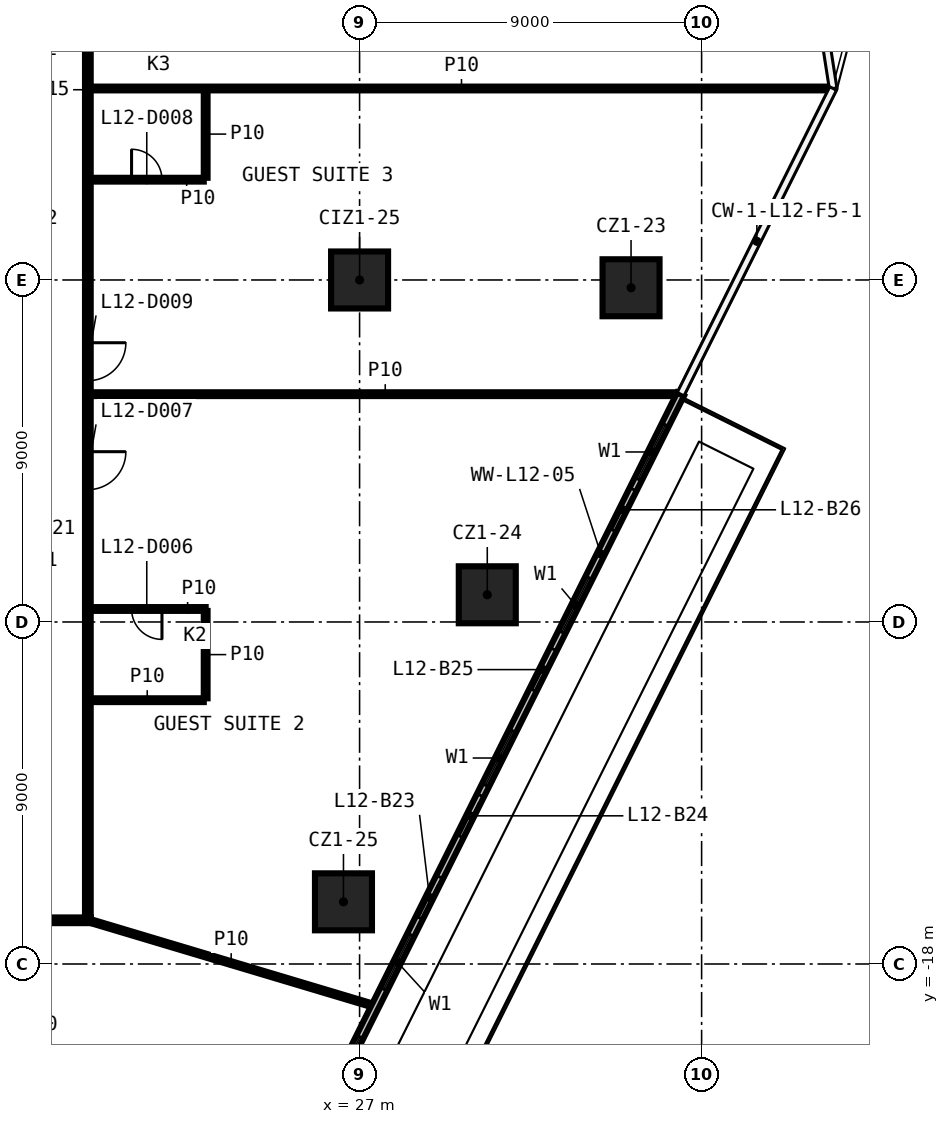
"""IFC4 building model, lengths in metres.
Left out: names, types, materials, properties, quantities, classifications, styles, units other than length and angle.
Written with IfcOpenShell. Run it as: python <this file> out.ifc"""

import sys

from ifc_helpers import new_model, si_unit, direction, frame, frame_2d, origin, origin_2d, place, context, subcontext, project, spatial, rectangle, extrude, element, fill, save


model = new_model("IFC4")
c1 = context("Model", 3, precision=1e-05, world=origin(), true_north=direction((0.0, 1.0)))
c2 = subcontext(c1, "Body", "Model", "MODEL_VIEW")
j1 = project(units=[si_unit("LENGTHUNIT", "METRE"), si_unit("PLANEANGLEUNIT", "RADIAN")], contexts=[c1])
p1 = place(None, origin())
s1 = spatial("IfcSite", under=j1, at=p1, CompositionType="ELEMENT")
p2 = place(p1, origin())
s2 = spatial("IfcBuilding", under=s1, at=p2, CompositionType="ELEMENT")
p3 = place(p2, frame((0.0, 0.0, 66.2)))
s3 = spatial("IfcBuildingStorey", under=s2, at=p3, CompositionType="ELEMENT", Elevation=66.2)
for number, where, z_axis, x_axis in (
    (1, (34.143, -0.205, 0.0), (0.0, 0.0, 1.0), (1.0, 0.0, 0.0)),
    (2, (30.36, -8.284, 0.0), (0.0, 0.0, 1.0), (1.0, 0.0, 0.0)),
    (3, (26.576, -16.364, 0.0), (0.0, 0.0, 1.0), (1.0, 0.0, 0.0)),
    (4, (27.0, 0.0, 0.0), (0.0, 0.0, 1.0), (1.0, 0.0, 0.0)),
):
    element("IfcColumn", number, at=place(p3, frame(where, z_axis=z_axis, x_axis=x_axis)), inside=s3, PredefinedType="COLUMN", context=c2, shape_type="SweptSolid", body=[
        extrude(rectangle(XDim=1.5, YDim=1.5, at=origin_2d()), origin(), (0.0, 0.0, 1.0), 3.3),
    ])
p4 = place(p3, frame((19.925, -16.85, 0.0), z_axis=(0.0, 0.0, 1.0), x_axis=(-1.0, 0.0, 0.0)))
e5 = element("IfcWall", 5, at=p4, inside=s3, PredefinedType="PARTITIONING", context=c2, shape_type="SweptSolid", body=[
    extrude(rectangle(XDim=39.85, YDim=0.15, at=frame_2d((19.925, 0.0))), origin(), (0.0, 0.0, 1.0), 3.3),
])
p5 = place(p4, frame((30.959, 0.0, 0.0)))
e6 = element("IfcOpeningElement", 6, at=p5, cuts=e5, PredefinedType="OPENING", context=c2, shape_type="SweptSolid", body=[
    extrude(rectangle(XDim=0.9, YDim=2.1, at=frame_2d((0.45, 1.05))), frame((0.0, 0.085, 0.0), z_axis=(0.0, -1.0, 0.0), x_axis=(1.0, 0.0, 0.0)), (0.0, 0.0, 1.0), 0.17),
])
p6 = place(p4, frame((22.077, 0.0, 0.0)))
e7 = element("IfcOpeningElement", 7, at=p6, cuts=e5, PredefinedType="OPENING", context=c2, shape_type="SweptSolid", body=[
    extrude(rectangle(XDim=0.9, YDim=2.1, at=frame_2d((0.45, 1.05))), frame((0.0, 0.085, 0.0), z_axis=(0.0, -1.0, 0.0), x_axis=(1.0, 0.0, 0.0)), (0.0, 0.0, 1.0), 0.17),
])
p7 = place(p3, frame((19.925, -11.058, 0.0), z_axis=(0.0, 0.0, 1.0), x_axis=(1.0, 0.0, 0.0)))
e8 = element("IfcWall", 8, at=p7, inside=s3, PredefinedType="PARTITIONING", context=c2, shape_type="SweptSolid", body=[
    extrude(rectangle(XDim=2.975, YDim=0.1, at=frame_2d((1.487, 0.0))), origin(), (0.0, 0.0, 1.0), 3.3),
])
p8 = place(p3, frame((22.95, -8.658, 0.0), z_axis=(0.0, 0.0, 1.0), x_axis=(-1.0, 0.0, 0.0)))
e9 = element("IfcWall", 9, at=p8, inside=s3, PredefinedType="PARTITIONING", context=c2, shape_type="SweptSolid", body=[
    extrude(rectangle(XDim=3.025, YDim=0.1, at=frame_2d((1.512, 0.0))), origin(), (0.0, 0.0, 1.0), 3.3),
])
p9 = place(p8, frame((1.15, 0.0, 0.0)))
e10 = element("IfcOpeningElement", 10, at=p9, cuts=e9, PredefinedType="OPENING", context=c2, shape_type="SweptSolid", body=[
    extrude(rectangle(XDim=0.8, YDim=2.1, at=frame_2d((0.4, 1.05))), frame((0.0, 0.06, 0.0), z_axis=(0.0, -1.0, 0.0), x_axis=(1.0, 0.0, 0.0)), (0.0, 0.0, 1.0), 0.12),
])
p10 = place(p3, frame((19.925, -3.005, 0.0), z_axis=(0.0, 0.0, 1.0), x_axis=(1.0, 0.0, 0.0)))
e11 = element("IfcWall", 11, at=p10, inside=s3, PredefinedType="PARTITIONING", context=c2, shape_type="SweptSolid", body=[
    extrude(rectangle(XDim=15.5, YDim=0.1, at=frame_2d((7.75, 0.0))), origin(), (0.0, 0.0, 1.0), 3.3),
])
p11 = place(p3, frame((19.925, 2.639, 0.0), z_axis=(0.0, 0.0, 1.0), x_axis=(1.0, 0.0, 0.0)))
e12 = element("IfcWall", 12, at=p11, inside=s3, PredefinedType="PARTITIONING", context=c2, shape_type="SweptSolid", body=[
    extrude(rectangle(XDim=2.975, YDim=0.1, at=frame_2d((1.487, 0.0))), origin(), (0.0, 0.0, 1.0), 3.3),
])
p12 = place(p11, frame((1.075, 0.0, 0.0)))
e13 = element("IfcOpeningElement", 13, at=p12, cuts=e12, PredefinedType="OPENING", context=c2, shape_type="SweptSolid", body=[
    extrude(rectangle(XDim=0.8, YDim=2.1, at=frame_2d((0.4, 1.05))), frame((0.0, 0.06, 0.0), z_axis=(0.0, -1.0, 0.0), x_axis=(1.0, 0.0, 0.0)), (0.0, 0.0, 1.0), 0.12),
])
p13 = place(p3, frame((19.925, 5.039, 0.0), z_axis=(0.0, 0.0, 1.0), x_axis=(1.0, 0.0, 0.0)))
e14 = element("IfcWall", 14, at=p13, inside=s3, PredefinedType="PARTITIONING", context=c2, shape_type="SweptSolid", body=[
    extrude(rectangle(XDim=19.513, YDim=0.1, at=frame_2d((9.757, 0.0))), origin(), (0.0, 0.0, 1.0), 3.3),
])
for number, where, z_axis, x_axis in (
    (15, (22.95, -11.009, 0.0), (0.0, 0.0, 1.0), (0.0, 1.0, 0.0)),
    (16, (22.95, 2.689, 0.0), (0.0, 0.0, 1.0), (0.0, 1.0, 0.0)),
):
    element("IfcWall", number, at=place(p3, frame(where, z_axis=z_axis, x_axis=x_axis)), inside=s3, PredefinedType="PARTITIONING", context=c2, shape_type="SweptSolid", body=[
        extrude(rectangle(XDim=2.3, YDim=0.1, at=frame_2d((1.15, 0.0))), origin(), (0.0, 0.0, 1.0), 3.3),
    ])
p14 = place(p3, frame((19.85, 16.775, 0.0), z_axis=(0.0, 0.0, 1.0), x_axis=(0.0, -1.0, 0.0)))
e17 = element("IfcWall", 17, at=p14, inside=s3, PredefinedType="PARTITIONING", context=c2, shape_type="SweptSolid", body=[
    extrude(rectangle(XDim=33.55, YDim=0.15, at=frame_2d((16.775, 0.0))), origin(), (0.0, 0.0, 1.0), 3.3),
])
p15 = place(p14, frame((21.293, 0.0, 0.0)))
e18 = element("IfcOpeningElement", 18, at=p15, cuts=e17, PredefinedType="OPENING", context=c2, shape_type="SweptSolid", body=[
    extrude(rectangle(XDim=1.0, YDim=2.1, at=frame_2d((0.5, 1.05))), frame((0.0, 0.085, 0.0), z_axis=(0.0, -1.0, 0.0), x_axis=(1.0, 0.0, 0.0)), (0.0, 0.0, 1.0), 0.17),
])
p16 = place(p14, frame((18.427, 0.0, 0.0)))
e19 = element("IfcOpeningElement", 19, at=p16, cuts=e17, PredefinedType="OPENING", context=c2, shape_type="SweptSolid", body=[
    extrude(rectangle(XDim=1.0, YDim=2.1, at=frame_2d((0.5, 1.05))), frame((0.0, 0.085, 0.0), z_axis=(0.0, -1.0, 0.0), x_axis=(1.0, 0.0, 0.0)), (0.0, 0.0, 1.0), 0.17),
])
p17 = place(p14, frame((4.211, 0.0, 0.0)))
e20 = element("IfcOpeningElement", 20, at=p17, cuts=e17, PredefinedType="OPENING", context=c2, shape_type="SweptSolid", body=[
    extrude(rectangle(XDim=0.9, YDim=2.1, at=frame_2d((0.45, 1.05))), frame((0.0, 0.085, 0.0), z_axis=(0.0, -1.0, 0.0), x_axis=(1.0, 0.0, 0.0)), (0.0, 0.0, 1.0), 0.17),
])
p18 = place(p3, frame((19.85, -16.85, 0.0), z_axis=(0.0, 0.0, 1.0), x_axis=(0.958075156501, -0.286517005597, 0.0)))
e21 = element("IfcWall", 21, at=p18, inside=s3, PredefinedType="PARTITIONING", context=c2, shape_type="SweptSolid", body=[
    extrude(rectangle(XDim=7.873, YDim=0.1, at=frame_2d((3.936, 0.0))), origin(), (0.0, 0.0, 1.0), 3.3),
])
p19 = place(p3, frame((23.394, -27.165, 0.0), z_axis=(0.0, 0.0, 1.0), x_axis=(0.446421309396, 0.894822895615, 0.0)))
e22 = element("IfcWall", 22, at=p19, inside=s3, PredefinedType="SOLIDWALL", context=c2, shape_type="SweptSolid", body=[
    extrude(rectangle(XDim=27.0, YDim=0.2, at=frame_2d((13.5, 0.0))), origin(), (0.0, 0.0, 1.0), 3.3),
])
p20 = place(p19, frame((0.5, 0.0, 0.6)))
e23 = element("IfcOpeningElement", 23, at=p20, cuts=e22, PredefinedType="OPENING", context=c2, shape_type="SweptSolid", body=[
    extrude(rectangle(XDim=1.6, YDim=2.4, at=frame_2d((0.8, 1.2))), frame((0.0, 0.11, 0.0), z_axis=(0.0, -1.0, 0.0), x_axis=(1.0, 0.0, 0.0)), (0.0, 0.0, 1.0), 0.22),
])
p21 = place(p19, frame((3.0, 0.0, 0.0)))
e24 = element("IfcOpeningElement", 24, at=p21, cuts=e22, PredefinedType="OPENING", context=c2, shape_type="SweptSolid", body=[
    extrude(rectangle(XDim=1.2, YDim=2.4, at=frame_2d((0.6, 1.2))), frame((0.0, 0.11, 0.0), z_axis=(0.0, -1.0, 0.0), x_axis=(1.0, 0.0, 0.0)), (0.0, 0.0, 1.0), 0.22),
])
p22 = place(p19, frame((6.5, 0.0, 0.6)))
e25 = element("IfcOpeningElement", 25, at=p22, cuts=e22, PredefinedType="OPENING", context=c2, shape_type="SweptSolid", body=[
    extrude(rectangle(XDim=1.6, YDim=2.4, at=frame_2d((0.8, 1.2))), frame((0.0, 0.11, 0.0), z_axis=(0.0, -1.0, 0.0), x_axis=(1.0, 0.0, 0.0)), (0.0, 0.0, 1.0), 0.22),
])
p23 = place(p19, frame((5.0, 0.0, 0.0)))
e26 = element("IfcOpeningElement", 26, at=p23, cuts=e22, PredefinedType="OPENING", context=c2, shape_type="SweptSolid", body=[
    extrude(rectangle(XDim=1.2, YDim=2.4, at=frame_2d((0.6, 1.2))), frame((0.0, 0.11, 0.0), z_axis=(0.0, -1.0, 0.0), x_axis=(1.0, 0.0, 0.0)), (0.0, 0.0, 1.0), 0.22),
])
p24 = place(p19, frame((9.5, 0.0, 0.6)))
e27 = element("IfcOpeningElement", 27, at=p24, cuts=e22, PredefinedType="OPENING", context=c2, shape_type="SweptSolid", body=[
    extrude(rectangle(XDim=1.6, YDim=2.4, at=frame_2d((0.8, 1.2))), frame((0.0, 0.11, 0.0), z_axis=(0.0, -1.0, 0.0), x_axis=(1.0, 0.0, 0.0)), (0.0, 0.0, 1.0), 0.22),
])
p25 = place(p19, frame((11.6, 0.0, 0.0)))
e28 = element("IfcOpeningElement", 28, at=p25, cuts=e22, PredefinedType="OPENING", context=c2, shape_type="SweptSolid", body=[
    extrude(rectangle(XDim=1.2, YDim=2.4, at=frame_2d((0.6, 1.2))), frame((0.0, 0.11, 0.0), z_axis=(0.0, -1.0, 0.0), x_axis=(1.0, 0.0, 0.0)), (0.0, 0.0, 1.0), 0.22),
])
p26 = place(p19, frame((15.5, 0.0, 0.6)))
e29 = element("IfcOpeningElement", 29, at=p26, cuts=e22, PredefinedType="OPENING", context=c2, shape_type="SweptSolid", body=[
    extrude(rectangle(XDim=1.6, YDim=2.4, at=frame_2d((0.8, 1.2))), frame((0.0, 0.11, 0.0), z_axis=(0.0, -1.0, 0.0), x_axis=(1.0, 0.0, 0.0)), (0.0, 0.0, 1.0), 0.22),
])
p27 = place(p19, frame((14.0, 0.0, 0.0)))
e30 = element("IfcOpeningElement", 30, at=p27, cuts=e22, PredefinedType="OPENING", context=c2, shape_type="SweptSolid", body=[
    extrude(rectangle(XDim=1.2, YDim=2.4, at=frame_2d((0.6, 1.2))), frame((0.0, 0.11, 0.0), z_axis=(0.0, -1.0, 0.0), x_axis=(1.0, 0.0, 0.0)), (0.0, 0.0, 1.0), 0.22),
])
p28 = place(p19, frame((20.0, 0.0, 0.6)))
e31 = element("IfcOpeningElement", 31, at=p28, cuts=e22, PredefinedType="OPENING", context=c2, shape_type="SweptSolid", body=[
    extrude(rectangle(XDim=1.6, YDim=2.4, at=frame_2d((0.8, 1.2))), frame((0.0, 0.11, 0.0), z_axis=(0.0, -1.0, 0.0), x_axis=(1.0, 0.0, 0.0)), (0.0, 0.0, 1.0), 0.22),
])
p29 = place(p19, frame((18.3, 0.0, 0.0)))
e32 = element("IfcOpeningElement", 32, at=p29, cuts=e22, PredefinedType="OPENING", context=c2, shape_type="SweptSolid", body=[
    extrude(rectangle(XDim=1.2, YDim=2.4, at=frame_2d((0.6, 1.2))), frame((0.0, 0.11, 0.0), z_axis=(0.0, -1.0, 0.0), x_axis=(1.0, 0.0, 0.0)), (0.0, 0.0, 1.0), 0.22),
])
p30 = place(p19, frame((24.5, 0.0, 0.6)))
e33 = element("IfcOpeningElement", 33, at=p30, cuts=e22, PredefinedType="OPENING", context=c2, shape_type="SweptSolid", body=[
    extrude(rectangle(XDim=1.6, YDim=2.4, at=frame_2d((0.8, 1.2))), frame((0.0, 0.11, 0.0), z_axis=(0.0, -1.0, 0.0), x_axis=(1.0, 0.0, 0.0)), (0.0, 0.0, 1.0), 0.22),
])
p31 = place(p19, frame((23.0, 0.0, 0.0)))
e34 = element("IfcOpeningElement", 34, at=p31, cuts=e22, PredefinedType="OPENING", context=c2, shape_type="SweptSolid", body=[
    extrude(rectangle(XDim=1.2, YDim=2.4, at=frame_2d((0.6, 1.2))), frame((0.0, 0.11, 0.0), z_axis=(0.0, -1.0, 0.0), x_axis=(1.0, 0.0, 0.0)), (0.0, 0.0, 1.0), 0.22),
])
p32 = place(p9, origin())
e35 = element("IfcDoor", 35, at=p32, inside=s3, OperationType="SINGLE_SWING_LEFT", PredefinedType="DOOR", context=c2, shape_type="SweptSolid", body=[
    extrude(rectangle(XDim=0.8, YDim=2.1, at=frame_2d((0.4, 1.05))), frame((0.0, 0.025, 0.0), z_axis=(0.0, -1.0, 0.0), x_axis=(1.0, 0.0, 0.0)), (0.0, 0.0, 1.0), 0.05),
])
fill(e10, e35)
p33 = place(p15, origin())
e36 = element("IfcDoor", 36, at=p33, inside=s3, OperationType="SINGLE_SWING_RIGHT", PredefinedType="DOOR", context=c2, shape_type="SweptSolid", body=[
    extrude(rectangle(XDim=1.0, YDim=2.1, at=frame_2d((0.5, 1.05))), frame((0.0, 0.025, 0.0), z_axis=(0.0, -1.0, 0.0), x_axis=(1.0, 0.0, 0.0)), (0.0, 0.0, 1.0), 0.05),
])
fill(e18, e36)
p34 = place(p12, origin())
e37 = element("IfcDoor", 37, at=p34, inside=s3, OperationType="SINGLE_SWING_RIGHT", PredefinedType="DOOR", context=c2, shape_type="SweptSolid", body=[
    extrude(rectangle(XDim=0.8, YDim=2.1, at=frame_2d((0.4, 1.05))), frame((0.0, 0.025, 0.0), z_axis=(0.0, -1.0, 0.0), x_axis=(1.0, 0.0, 0.0)), (0.0, 0.0, 1.0), 0.05),
])
fill(e13, e37)
p35 = place(p16, origin())
e38 = element("IfcDoor", 38, at=p35, inside=s3, OperationType="SINGLE_SWING_LEFT", PredefinedType="DOOR", context=c2, shape_type="SweptSolid", body=[
    extrude(rectangle(XDim=1.0, YDim=2.1, at=frame_2d((0.5, 1.05))), frame((0.0, 0.025, 0.0), z_axis=(0.0, -1.0, 0.0), x_axis=(1.0, 0.0, 0.0)), (0.0, 0.0, 1.0), 0.05),
])
fill(e19, e38)
p36 = place(p22, origin())
e39 = element("IfcWindow", 39, at=p36, inside=s3, PartitioningType="SINGLE_PANEL", PredefinedType="WINDOW", context=c2, shape_type="SweptSolid", body=[
    extrude(rectangle(XDim=1.6, YDim=2.4, at=frame_2d((0.8, 1.2))), frame((0.0, 0.03, 0.0), z_axis=(0.0, -1.0, 0.0), x_axis=(1.0, 0.0, 0.0)), (0.0, 0.0, 1.0), 0.06),
])
fill(e25, e39)
p37 = place(p24, origin())
e40 = element("IfcWindow", 40, at=p37, inside=s3, PartitioningType="SINGLE_PANEL", PredefinedType="WINDOW", context=c2, shape_type="SweptSolid", body=[
    extrude(rectangle(XDim=1.6, YDim=2.4, at=frame_2d((0.8, 1.2))), frame((0.0, 0.03, 0.0), z_axis=(0.0, -1.0, 0.0), x_axis=(1.0, 0.0, 0.0)), (0.0, 0.0, 1.0), 0.06),
])
fill(e27, e40)
p38 = place(p25, origin())
e41 = element("IfcDoor", 41, at=p38, inside=s3, OperationType="SLIDING_TO_LEFT", PredefinedType="DOOR", context=c2, shape_type="SweptSolid", body=[
    extrude(rectangle(XDim=1.2, YDim=2.4, at=frame_2d((0.6, 1.2))), frame((0.0, 0.025, 0.0), z_axis=(0.0, -1.0, 0.0), x_axis=(1.0, 0.0, 0.0)), (0.0, 0.0, 1.0), 0.05),
])
fill(e28, e41)
p39 = place(p26, origin())
e42 = element("IfcWindow", 42, at=p39, inside=s3, PartitioningType="SINGLE_PANEL", PredefinedType="WINDOW", context=c2, shape_type="SweptSolid", body=[
    extrude(rectangle(XDim=1.6, YDim=2.4, at=frame_2d((0.8, 1.2))), frame((0.0, 0.03, 0.0), z_axis=(0.0, -1.0, 0.0), x_axis=(1.0, 0.0, 0.0)), (0.0, 0.0, 1.0), 0.06),
])
fill(e29, e42)
p40 = place(p27, origin())
e43 = element("IfcDoor", 43, at=p40, inside=s3, OperationType="SLIDING_TO_LEFT", PredefinedType="DOOR", context=c2, shape_type="SweptSolid", body=[
    extrude(rectangle(XDim=1.2, YDim=2.4, at=frame_2d((0.6, 1.2))), frame((0.0, 0.025, 0.0), z_axis=(0.0, -1.0, 0.0), x_axis=(1.0, 0.0, 0.0)), (0.0, 0.0, 1.0), 0.05),
])
fill(e30, e43)
p41 = place(p28, origin())
e44 = element("IfcWindow", 44, at=p41, inside=s3, PartitioningType="SINGLE_PANEL", PredefinedType="WINDOW", context=c2, shape_type="SweptSolid", body=[
    extrude(rectangle(XDim=1.6, YDim=2.4, at=frame_2d((0.8, 1.2))), frame((0.0, 0.03, 0.0), z_axis=(0.0, -1.0, 0.0), x_axis=(1.0, 0.0, 0.0)), (0.0, 0.0, 1.0), 0.06),
])
fill(e31, e44)
p42 = place(p29, origin())
e45 = element("IfcDoor", 45, at=p42, inside=s3, OperationType="SLIDING_TO_LEFT", PredefinedType="DOOR", context=c2, shape_type="SweptSolid", body=[
    extrude(rectangle(XDim=1.2, YDim=2.4, at=frame_2d((0.6, 1.2))), frame((0.0, 0.025, 0.0), z_axis=(0.0, -1.0, 0.0), x_axis=(1.0, 0.0, 0.0)), (0.0, 0.0, 1.0), 0.05),
])
fill(e32, e45)
p43 = place(p30, origin())
e46 = element("IfcWindow", 46, at=p43, inside=s3, PartitioningType="SINGLE_PANEL", PredefinedType="WINDOW", context=c2, shape_type="SweptSolid", body=[
    extrude(rectangle(XDim=1.6, YDim=2.4, at=frame_2d((0.8, 1.2))), frame((0.0, 0.03, 0.0), z_axis=(0.0, -1.0, 0.0), x_axis=(1.0, 0.0, 0.0)), (0.0, 0.0, 1.0), 0.06),
])
fill(e33, e46)
p44 = place(p31, origin())
e47 = element("IfcDoor", 47, at=p44, inside=s3, OperationType="SLIDING_TO_LEFT", PredefinedType="DOOR", context=c2, shape_type="SweptSolid", body=[
    extrude(rectangle(XDim=1.2, YDim=2.4, at=frame_2d((0.6, 1.2))), frame((0.0, 0.025, 0.0), z_axis=(0.0, -1.0, 0.0), x_axis=(1.0, 0.0, 0.0)), (0.0, 0.0, 1.0), 0.05),
])
fill(e34, e47)
save(model, sys.argv[1])
